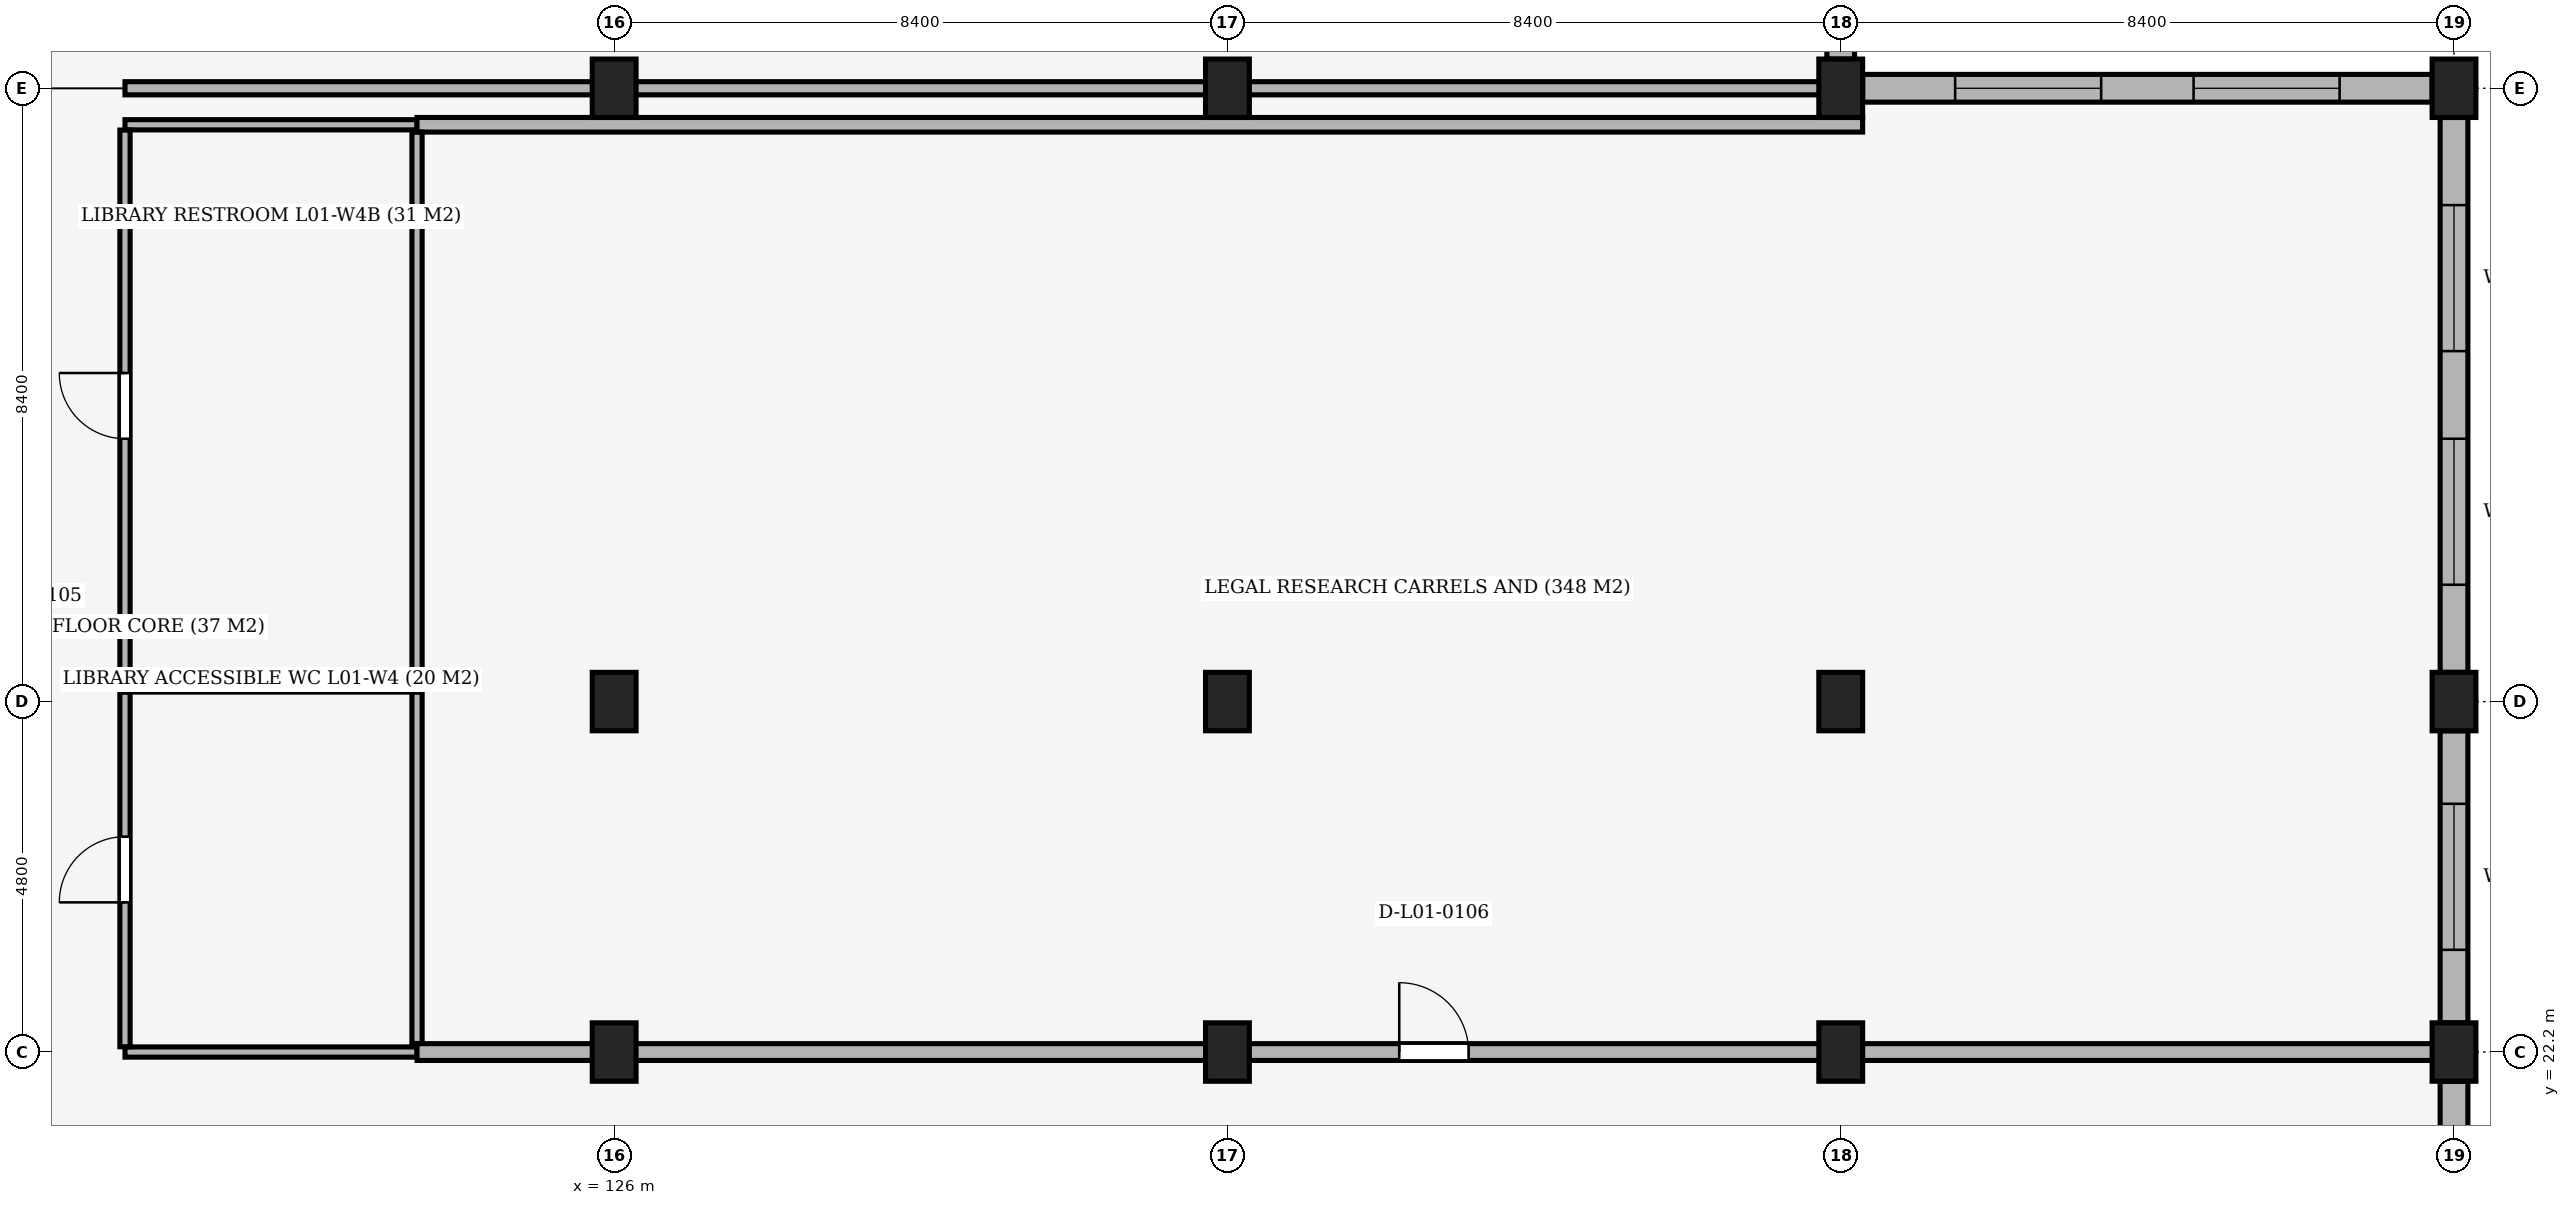
"""IFC4 building model, lengths in metres.
Left out: names, types, materials, properties, quantities, classifications, styles, units other than length and angle.
Written with IfcOpenShell. Run it as: python <this file> out.ifc"""

import sys

from ifc_helpers import new_model, si_unit, direction, frame, frame_2d, origin, origin_2d, place, context, subcontext, project, spatial, rectangle, extrude, element, fill, save


model = new_model("IFC4")
c1 = context("Model", 3, precision=1e-05, world=origin(), true_north=direction((0.0, 1.0)))
c2 = subcontext(c1, "Body", "Model", "MODEL_VIEW")
j1 = project(units=[si_unit("LENGTHUNIT", "METRE"), si_unit("PLANEANGLEUNIT", "RADIAN")], contexts=[c1])
p1 = place(None, origin())
s1 = spatial("IfcSite", under=j1, at=p1, CompositionType="ELEMENT")
p2 = place(p1, origin())
s2 = spatial("IfcBuilding", under=s1, at=p2, CompositionType="ELEMENT")
p3 = place(p2, frame((0.0, 0.0, 5.1)))
s3 = spatial("IfcBuildingStorey", under=s2, at=p3, CompositionType="ELEMENT", Elevation=5.1)
for number, where, z_axis, x_axis in (
    (1, (126.0, 22.2, 0.0), (0.0, 0.0, 1.0), (1.0, 0.0, 0.0)),
    (2, (126.0, 27.0, 0.0), (0.0, 0.0, 1.0), (1.0, 0.0, 0.0)),
    (3, (126.0, 35.4, 0.0), (0.0, 0.0, 1.0), (1.0, 0.0, 0.0)),
    (4, (134.4, 22.2, 0.0), (0.0, 0.0, 1.0), (1.0, 0.0, 0.0)),
    (5, (134.4, 27.0, 0.0), (0.0, 0.0, 1.0), (1.0, 0.0, 0.0)),
    (6, (134.4, 35.4, 0.0), (0.0, 0.0, 1.0), (1.0, 0.0, 0.0)),
    (7, (142.8, 22.2, 0.0), (0.0, 0.0, 1.0), (1.0, 0.0, 0.0)),
    (8, (142.8, 27.0, 0.0), (0.0, 0.0, 1.0), (1.0, 0.0, 0.0)),
    (9, (142.8, 35.4, 0.0), (0.0, 0.0, 1.0), (1.0, 0.0, 0.0)),
    (10, (151.2, 22.2, 0.0), (0.0, 0.0, 1.0), (1.0, 0.0, 0.0)),
    (11, (151.2, 27.0, 0.0), (0.0, 0.0, 1.0), (1.0, 0.0, 0.0)),
    (12, (151.2, 35.4, 0.0), (0.0, 0.0, 1.0), (1.0, 0.0, 0.0)),
):
    element("IfcColumn", number, at=place(p3, frame(where, z_axis=z_axis, x_axis=x_axis)), inside=s3, PredefinedType="COLUMN", context=c2, shape_type="SweptSolid", body=[
        extrude(rectangle(XDim=0.6, YDim=0.8, at=origin_2d()), origin(), (0.0, 0.0, 1.0), 5.1),
    ])
p4 = place(p3, frame((142.8, 40.575, 0.0), z_axis=(0.0, 0.0, 1.0), x_axis=(0.0, -1.0, 0.0)))
e13 = element("IfcWall", 13, at=p4, inside=s3, PredefinedType="SOLIDWALL", context=c2, shape_type="SweptSolid", body=[
    extrude(rectangle(XDim=4.775, YDim=0.38, at=frame_2d((2.387, 0.0))), origin(), (0.0, 0.0, 1.0), 4.02),
])
p5 = place(p4, frame((1.388, 0.0, 2.1)))
e14 = element("IfcOpeningElement", 14, at=p5, cuts=e13, PredefinedType="OPENING", context=c2, shape_type="SweptSolid", body=[
    extrude(rectangle(XDim=2.0, YDim=1.2, at=frame_2d((1.0, 0.6))), frame((0.0, 0.205, 0.0), z_axis=(0.0, -1.0, 0.0), x_axis=(1.0, 0.0, 0.0)), (0.0, 0.0, 1.0), 0.41),
])
p6 = place(p3, frame((143.1, 35.4, 0.0), z_axis=(0.0, 0.0, 1.0), x_axis=(1.0, 0.0, 0.0)))
e15 = element("IfcWall", 15, at=p6, inside=s3, PredefinedType="SOLIDWALL", context=c2, shape_type="SweptSolid", body=[
    extrude(rectangle(XDim=7.8, YDim=0.38, at=frame_2d((3.9, 0.0))), origin(), (0.0, 0.0, 1.0), 4.07),
])
p7 = place(p6, frame((1.267, 0.0, 2.1)))
e16 = element("IfcOpeningElement", 16, at=p7, cuts=e15, PredefinedType="OPENING", context=c2, shape_type="SweptSolid", body=[
    extrude(rectangle(XDim=2.0, YDim=1.2, at=frame_2d((1.0, 0.6))), frame((0.0, 0.205, 0.0), z_axis=(0.0, -1.0, 0.0), x_axis=(1.0, 0.0, 0.0)), (0.0, 0.0, 1.0), 0.41),
])
p8 = place(p6, frame((4.533, 0.0, 2.1)))
e17 = element("IfcOpeningElement", 17, at=p8, cuts=e15, PredefinedType="OPENING", context=c2, shape_type="SweptSolid", body=[
    extrude(rectangle(XDim=2.0, YDim=1.2, at=frame_2d((1.0, 0.6))), frame((0.0, 0.205, 0.0), z_axis=(0.0, -1.0, 0.0), x_axis=(1.0, 0.0, 0.0)), (0.0, 0.0, 1.0), 0.41),
])
p9 = place(p3, frame((151.2, 35.0, 0.0), z_axis=(0.0, 0.0, 1.0), x_axis=(0.0, -1.0, 0.0)))
e18 = element("IfcWall", 18, at=p9, inside=s3, PredefinedType="SOLIDWALL", context=c2, shape_type="SweptSolid", body=[
    extrude(rectangle(XDim=7.6, YDim=0.38, at=frame_2d((3.8, 0.0))), origin(), (0.0, 0.0, 1.0), 4.02),
])
p10 = place(p9, frame((1.2, 0.0, 2.1)))
e19 = element("IfcOpeningElement", 19, at=p10, cuts=e18, PredefinedType="OPENING", context=c2, shape_type="SweptSolid", body=[
    extrude(rectangle(XDim=2.0, YDim=1.2, at=frame_2d((1.0, 0.6))), frame((0.0, 0.205, 0.0), z_axis=(0.0, -1.0, 0.0), x_axis=(1.0, 0.0, 0.0)), (0.0, 0.0, 1.0), 0.41),
])
p11 = place(p9, frame((4.4, 0.0, 2.1)))
e20 = element("IfcOpeningElement", 20, at=p11, cuts=e18, PredefinedType="OPENING", context=c2, shape_type="SweptSolid", body=[
    extrude(rectangle(XDim=2.0, YDim=1.2, at=frame_2d((1.0, 0.6))), frame((0.0, 0.205, 0.0), z_axis=(0.0, -1.0, 0.0), x_axis=(1.0, 0.0, 0.0)), (0.0, 0.0, 1.0), 0.41),
])
p12 = place(p3, frame((151.2, 26.6, 0.0), z_axis=(0.0, 0.0, 1.0), x_axis=(0.0, -1.0, 0.0)))
e21 = element("IfcWall", 21, at=p12, inside=s3, PredefinedType="SOLIDWALL", context=c2, shape_type="SweptSolid", body=[
    extrude(rectangle(XDim=4.0, YDim=0.38, at=frame_2d((2.0, 0.0))), origin(), (0.0, 0.0, 1.0), 4.27),
])
p13 = place(p12, frame((1.0, 0.0, 2.1)))
e22 = element("IfcOpeningElement", 22, at=p13, cuts=e21, PredefinedType="OPENING", context=c2, shape_type="SweptSolid", body=[
    extrude(rectangle(XDim=2.0, YDim=1.2, at=frame_2d((1.0, 0.6))), frame((0.0, 0.205, 0.0), z_axis=(0.0, -1.0, 0.0), x_axis=(1.0, 0.0, 0.0)), (0.0, 0.0, 1.0), 0.41),
])
p14 = place(p3, frame((151.2, 21.8, 0.0), z_axis=(0.0, 0.0, 1.0), x_axis=(0.0, -1.0, 0.0)))
e23 = element("IfcWall", 23, at=p14, inside=s3, PredefinedType="SOLIDWALL", context=c2, shape_type="SweptSolid", body=[
    extrude(rectangle(XDim=16.0, YDim=0.38, at=frame_2d((8.0, 0.0))), origin(), (0.0, 0.0, 1.0), 3.67),
])
p15 = place(p14, frame((4.0, 0.0, 2.1)))
e24 = element("IfcOpeningElement", 24, at=p15, cuts=e23, PredefinedType="OPENING", context=c2, shape_type="SweptSolid", body=[
    extrude(rectangle(XDim=2.0, YDim=1.2, at=frame_2d((1.0, 0.6))), frame((0.0, 0.205, 0.0), z_axis=(0.0, -1.0, 0.0), x_axis=(1.0, 0.0, 0.0)), (0.0, 0.0, 1.0), 0.41),
])
p16 = place(p14, frame((10.0, 0.0, 2.1)))
e25 = element("IfcOpeningElement", 25, at=p16, cuts=e23, PredefinedType="OPENING", context=c2, shape_type="SweptSolid", body=[
    extrude(rectangle(XDim=2.0, YDim=1.2, at=frame_2d((1.0, 0.6))), frame((0.0, 0.205, 0.0), z_axis=(0.0, -1.0, 0.0), x_axis=(1.0, 0.0, 0.0)), (0.0, 0.0, 1.0), 0.41),
])
p17 = place(p3, frame((119.3, 22.2, 0.0), z_axis=(0.0, 0.0, 1.0), x_axis=(1.0, 0.0, 0.0)))
e26 = element("IfcWall", 26, at=p17, inside=s3, PredefinedType="PARTITIONING", context=c2, shape_type="SweptSolid", body=[
    extrude(rectangle(XDim=4.0, YDim=0.14, at=frame_2d((2.0, 0.0))), origin(), (0.0, 0.0, 1.0), 4.07),
])
p18 = place(p3, frame((123.3, 22.2, 0.0), z_axis=(0.0, 0.0, 1.0), x_axis=(1.0, 0.0, 0.0)))
e27 = element("IfcWall", 27, at=p18, inside=s3, PredefinedType="SOLIDWALL", context=c2, shape_type="SweptSolid", body=[
    extrude(rectangle(XDim=27.855, YDim=0.23, at=frame_2d((13.927, 0.0))), origin(), (0.0, 0.0, 1.0), 3.67),
])
p19 = place(p18, frame((13.453, 0.0, 0.0)))
e28 = element("IfcOpeningElement", 28, at=p19, cuts=e27, PredefinedType="OPENING", context=c2, shape_type="SweptSolid", body=[
    extrude(rectangle(XDim=0.95, YDim=2.1, at=frame_2d((0.475, 1.05))), frame((0.0, 0.13, 0.0), z_axis=(0.0, -1.0, 0.0), x_axis=(1.0, 0.0, 0.0)), (0.0, 0.0, 1.0), 0.26),
])
p20 = place(p3, frame((119.3, 27.2, 0.0), z_axis=(0.0, 0.0, 1.0), x_axis=(1.0, 0.0, 0.0)))
e29 = element("IfcWall", 29, at=p20, inside=s3, PredefinedType="PARTITIONING", context=c2, shape_type="SweptSolid", body=[
    extrude(rectangle(XDim=4.0, YDim=0.14, at=frame_2d((2.0, 0.0))), origin(), (0.0, 0.0, 1.0), 4.07),
])
p21 = place(p3, frame((119.3, 34.9, 0.0), z_axis=(0.0, 0.0, 1.0), x_axis=(1.0, 0.0, 0.0)))
e30 = element("IfcWall", 30, at=p21, inside=s3, PredefinedType="PARTITIONING", context=c2, shape_type="SweptSolid", body=[
    extrude(rectangle(XDim=4.0, YDim=0.14, at=frame_2d((2.0, 0.0))), origin(), (0.0, 0.0, 1.0), 4.82),
])
p22 = place(p3, frame((123.3, 34.9, 0.0), z_axis=(0.0, 0.0, 1.0), x_axis=(1.0, 0.0, 0.0)))
e31 = element("IfcWall", 31, at=p22, inside=s3, PredefinedType="PARTITIONING", context=c2, shape_type="SweptSolid", body=[
    extrude(rectangle(XDim=19.8, YDim=0.2, at=frame_2d((9.9, 0.0))), origin(), (0.0, 0.0, 1.0), 4.02),
])
p23 = place(p3, frame((119.3, 35.4, 0.0), z_axis=(0.0, 0.0, 1.0), x_axis=(1.0, 0.0, 0.0)))
e32 = element("IfcWall", 32, at=p23, inside=s3, PredefinedType="PARTITIONING", context=c2, shape_type="SweptSolid", body=[
    extrude(rectangle(XDim=23.481, YDim=0.18, at=frame_2d((11.74, 0.0))), origin(), (0.0, 0.0, 1.0), 4.07),
])
p24 = place(p3, frame((119.3, 22.272, 0.0), z_axis=(0.0, 0.0, 1.0), x_axis=(0.0, 1.0, 0.0)))
e33 = element("IfcWall", 33, at=p24, inside=s3, PredefinedType="PARTITIONING", context=c2, shape_type="SweptSolid", body=[
    extrude(rectangle(XDim=4.856, YDim=0.14, at=frame_2d((2.428, 0.0))), origin(), (0.0, 0.0, 1.0), 4.07),
])
p25 = place(p24, frame((1.978, 0.0, 0.0)))
e34 = element("IfcOpeningElement", 34, at=p25, cuts=e33, PredefinedType="OPENING", context=c2, shape_type="SweptSolid", body=[
    extrude(rectangle(XDim=0.9, YDim=2.1, at=frame_2d((0.45, 1.05))), frame((0.0, 0.085, 0.0), z_axis=(0.0, -1.0, 0.0), x_axis=(1.0, 0.0, 0.0)), (0.0, 0.0, 1.0), 0.17),
])
p26 = place(p3, frame((119.3, 27.272, 0.0), z_axis=(0.0, 0.0, 1.0), x_axis=(0.0, 1.0, 0.0)))
e35 = element("IfcWall", 35, at=p26, inside=s3, PredefinedType="PARTITIONING", context=c2, shape_type="SweptSolid", body=[
    extrude(rectangle(XDim=7.556, YDim=0.14, at=frame_2d((3.778, 0.0))), origin(), (0.0, 0.0, 1.0), 4.07),
])
p27 = place(p26, frame((3.328, 0.0, 0.0)))
e36 = element("IfcOpeningElement", 36, at=p27, cuts=e35, PredefinedType="OPENING", context=c2, shape_type="SweptSolid", body=[
    extrude(rectangle(XDim=0.9, YDim=2.1, at=frame_2d((0.45, 1.05))), frame((0.0, 0.085, 0.0), z_axis=(0.0, -1.0, 0.0), x_axis=(1.0, 0.0, 0.0)), (0.0, 0.0, 1.0), 0.17),
])
p28 = place(p3, frame((123.3, 22.317, 0.0), z_axis=(0.0, 0.0, 1.0), x_axis=(0.0, 1.0, 0.0)))
e37 = element("IfcWall", 37, at=p28, inside=s3, PredefinedType="PARTITIONING", context=c2, shape_type="SweptSolid", body=[
    extrude(rectangle(XDim=4.811, YDim=0.14, at=frame_2d((2.406, 0.0))), origin(), (0.0, 0.0, 1.0), 4.07),
])
p29 = place(p3, frame((123.3, 27.272, 0.0), z_axis=(0.0, 0.0, 1.0), x_axis=(0.0, 1.0, 0.0)))
e38 = element("IfcWall", 38, at=p29, inside=s3, PredefinedType="PARTITIONING", context=c2, shape_type="SweptSolid", body=[
    extrude(rectangle(XDim=7.526, YDim=0.14, at=frame_2d((3.763, 0.0))), origin(), (0.0, 0.0, 1.0), 4.07),
])
p30 = place(p7, origin())
e39 = element("IfcWindow", 39, at=p30, inside=s3, PartitioningType="SINGLE_PANEL", PredefinedType="WINDOW", context=c2, shape_type="SweptSolid", body=[
    extrude(rectangle(XDim=2.0, YDim=1.2, at=frame_2d((1.0, 0.6))), frame((0.0, 0.03, 0.0), z_axis=(0.0, -1.0, 0.0), x_axis=(1.0, 0.0, 0.0)), (0.0, 0.0, 1.0), 0.06),
])
fill(e16, e39)
p31 = place(p8, origin())
e40 = element("IfcWindow", 40, at=p31, inside=s3, PartitioningType="SINGLE_PANEL", PredefinedType="WINDOW", context=c2, shape_type="SweptSolid", body=[
    extrude(rectangle(XDim=2.0, YDim=1.2, at=frame_2d((1.0, 0.6))), frame((0.0, 0.03, 0.0), z_axis=(0.0, -1.0, 0.0), x_axis=(1.0, 0.0, 0.0)), (0.0, 0.0, 1.0), 0.06),
])
fill(e17, e40)
p32 = place(p10, origin())
e41 = element("IfcWindow", 41, at=p32, inside=s3, PartitioningType="SINGLE_PANEL", PredefinedType="WINDOW", context=c2, shape_type="SweptSolid", body=[
    extrude(rectangle(XDim=2.0, YDim=1.2, at=frame_2d((1.0, 0.6))), frame((0.0, 0.03, 0.0), z_axis=(0.0, -1.0, 0.0), x_axis=(1.0, 0.0, 0.0)), (0.0, 0.0, 1.0), 0.06),
])
fill(e19, e41)
p33 = place(p11, origin())
e42 = element("IfcWindow", 42, at=p33, inside=s3, PartitioningType="SINGLE_PANEL", PredefinedType="WINDOW", context=c2, shape_type="SweptSolid", body=[
    extrude(rectangle(XDim=2.0, YDim=1.2, at=frame_2d((1.0, 0.6))), frame((0.0, 0.03, 0.0), z_axis=(0.0, -1.0, 0.0), x_axis=(1.0, 0.0, 0.0)), (0.0, 0.0, 1.0), 0.06),
])
fill(e20, e42)
p34 = place(p13, origin())
e43 = element("IfcWindow", 43, at=p34, inside=s3, PartitioningType="SINGLE_PANEL", PredefinedType="WINDOW", context=c2, shape_type="SweptSolid", body=[
    extrude(rectangle(XDim=2.0, YDim=1.2, at=frame_2d((1.0, 0.6))), frame((0.0, 0.03, 0.0), z_axis=(0.0, -1.0, 0.0), x_axis=(1.0, 0.0, 0.0)), (0.0, 0.0, 1.0), 0.06),
])
fill(e22, e43)
p35 = place(p25, origin())
e44 = element("IfcDoor", 44, at=p35, inside=s3, OperationType="SINGLE_SWING_LEFT", PredefinedType="DOOR", context=c2, shape_type="SweptSolid", body=[
    extrude(rectangle(XDim=0.9, YDim=2.1, at=frame_2d((0.45, 1.05))), frame((0.0, 0.025, 0.0), z_axis=(0.0, -1.0, 0.0), x_axis=(1.0, 0.0, 0.0)), (0.0, 0.0, 1.0), 0.05),
])
fill(e34, e44)
p36 = place(p27, origin())
e45 = element("IfcDoor", 45, at=p36, inside=s3, OperationType="SINGLE_SWING_RIGHT", PredefinedType="DOOR", context=c2, shape_type="SweptSolid", body=[
    extrude(rectangle(XDim=0.9, YDim=2.1, at=frame_2d((0.45, 1.05))), frame((0.0, 0.025, 0.0), z_axis=(0.0, -1.0, 0.0), x_axis=(1.0, 0.0, 0.0)), (0.0, 0.0, 1.0), 0.05),
])
fill(e36, e45)
p37 = place(p19, origin())
e46 = element("IfcDoor", 46, at=p37, inside=s3, OperationType="SINGLE_SWING_LEFT", PredefinedType="DOOR", context=c2, shape_type="SweptSolid", body=[
    extrude(rectangle(XDim=0.95, YDim=2.1, at=frame_2d((0.475, 1.05))), frame((0.0, 0.025, 0.0), z_axis=(0.0, -1.0, 0.0), x_axis=(1.0, 0.0, 0.0)), (0.0, 0.0, 1.0), 0.05),
])
fill(e28, e46)
save(model, sys.argv[1])
